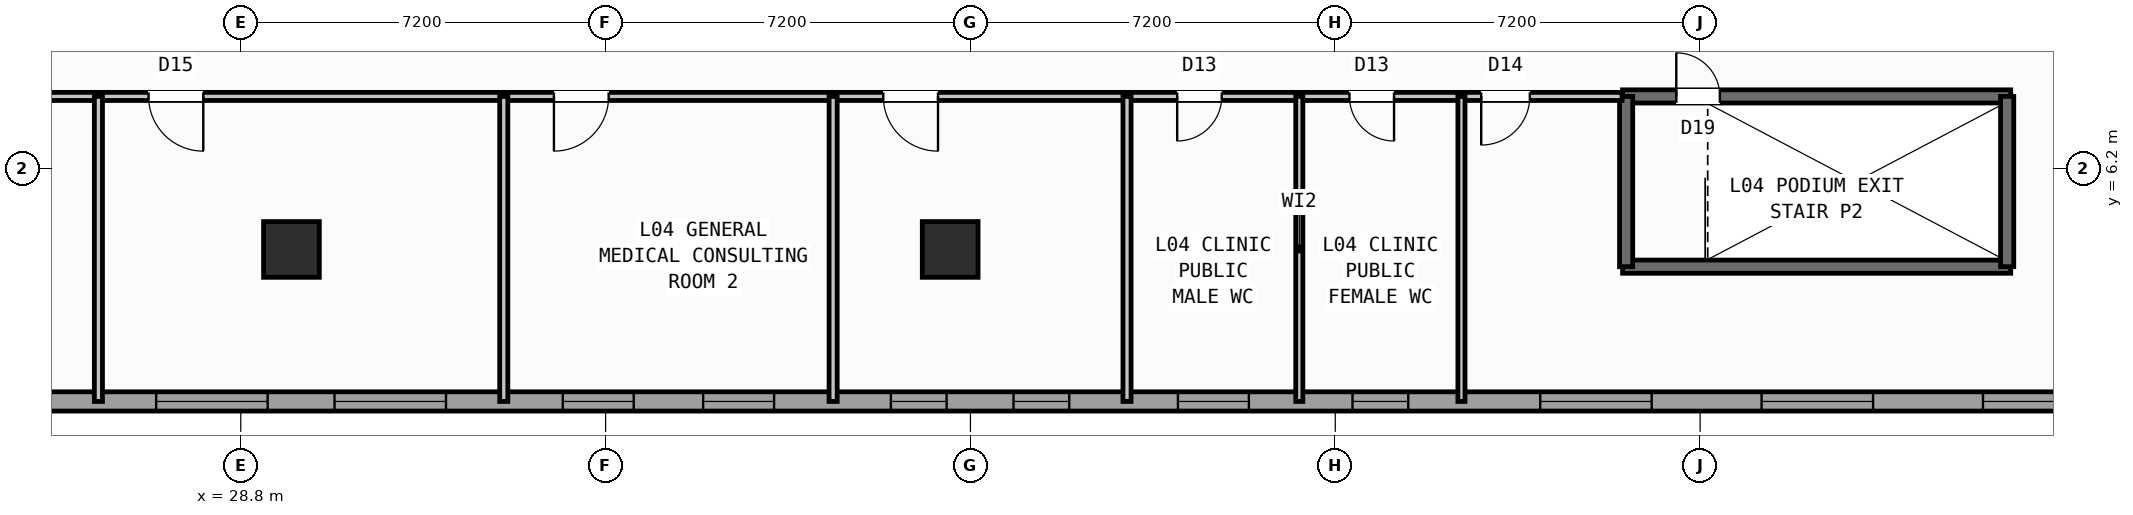
"""IFC4 building model, lengths in metres.
Left out: names, types, materials, properties, quantities, classifications, styles, units other than length and angle.
Written with IfcOpenShell. Run it as: python <this file> out.ifc"""

import sys

from ifc_helpers import new_model, si_unit, direction, frame, frame_2d, origin, origin_2d, place, context, subcontext, project, spatial, rectangle, hollow_rectangle, extrude, source, transform, mapped, element, fill, save


model = new_model("IFC4")
c1 = context("Model", 3, precision=1e-05, world=origin(), true_north=direction((0.0, 1.0)))
c2 = subcontext(c1, "Body", "Model", "MODEL_VIEW")
j1 = project(units=[si_unit("LENGTHUNIT", "METRE"), si_unit("PLANEANGLEUNIT", "RADIAN")], contexts=[c1])
p1 = place(None, origin())
s1 = spatial("IfcSite", under=j1, at=p1, CompositionType="ELEMENT")
p2 = place(p1, origin())
s2 = spatial("IfcBuilding", under=s1, at=p2, CompositionType="ELEMENT")
p3 = place(p2, frame((0.0, 0.0, 18.6)))
s3 = spatial("IfcBuildingStorey", under=s2, at=p3, CompositionType="ELEMENT", Elevation=18.6)
m1 = source(origin(), c2, "Body", "SweptSolid", [
    extrude(hollow_rectangle(XDim=1.1, YDim=1.1, WallThickness=0.04, at=origin_2d()), origin(), (0.0, 0.0, 1.0), 5.4),
])
for number, where, z_axis, x_axis in (
    (1, (29.8, 4.6, 0.0), (0.0, 0.0, 1.0), (1.0, 0.0, 0.0)),
    (2, (42.8, 4.6, 0.0), (0.0, 0.0, 1.0), (1.0, 0.0, 0.0)),
):
    element("IfcColumn", number, at=place(p3, frame(where, z_axis=z_axis, x_axis=x_axis)), inside=s3, PredefinedType="COLUMN", context=c2, shape_type="MappedRepresentation", body=[
        mapped(m1, transform((0.0, 0.0, 0.0), scale=1.0)),
    ])
p4 = place(p3, frame((67.117, 1.6, 0.0), z_axis=(0.0, 0.0, 1.0), x_axis=(-1.0, 0.0, 0.0)))
e3 = element("IfcWall", 3, at=p4, inside=s3, PredefinedType="STANDARD", context=c2, shape_type="SweptSolid", body=[
    extrude(rectangle(XDim=62.234, YDim=0.38, at=frame_2d((31.117, 0.0))), origin(), (0.0, 0.0, 1.0), 4.95),
])
p5 = place(p4, frame((1.735, 0.0, 0.85)))
e4 = element("IfcOpeningElement", 4, at=p5, cuts=e3, PredefinedType="OPENING", context=c2, shape_type="SweptSolid", body=[
    extrude(rectangle(XDim=2.2, YDim=1.75, at=frame_2d((1.1, 0.875))), frame((0.0, 0.2, 0.0), z_axis=(0.0, -1.0, 0.0), x_axis=(1.0, 0.0, 0.0)), (0.0, 0.0, 1.0), 0.4),
])
p6 = place(p4, frame((6.104, 0.0, 0.85)))
e5 = element("IfcOpeningElement", 5, at=p6, cuts=e3, PredefinedType="OPENING", context=c2, shape_type="SweptSolid", body=[
    extrude(rectangle(XDim=2.2, YDim=1.75, at=frame_2d((1.1, 0.875))), frame((0.0, 0.2, 0.0), z_axis=(0.0, -1.0, 0.0), x_axis=(1.0, 0.0, 0.0)), (0.0, 0.0, 1.0), 0.4),
])
p7 = place(p4, frame((10.473, 0.0, 0.85)))
e6 = element("IfcOpeningElement", 6, at=p7, cuts=e3, PredefinedType="OPENING", context=c2, shape_type="SweptSolid", body=[
    extrude(rectangle(XDim=2.2, YDim=1.75, at=frame_2d((1.1, 0.875))), frame((0.0, 0.2, 0.0), z_axis=(0.0, -1.0, 0.0), x_axis=(1.0, 0.0, 0.0)), (0.0, 0.0, 1.0), 0.4),
])
p8 = place(p4, frame((15.277, 0.0, 1.0)))
e7 = element("IfcOpeningElement", 7, at=p8, cuts=e3, PredefinedType="OPENING", context=c2, shape_type="SweptSolid", body=[
    extrude(rectangle(XDim=1.1, YDim=1.35, at=frame_2d((0.55, 0.675))), frame((0.0, 0.2, 0.0), z_axis=(0.0, -1.0, 0.0), x_axis=(1.0, 0.0, 0.0)), (0.0, 0.0, 1.0), 0.4),
])
p9 = place(p4, frame((18.422, 0.0, 0.95)))
e8 = element("IfcOpeningElement", 8, at=p9, cuts=e3, PredefinedType="OPENING", context=c2, shape_type="SweptSolid", body=[
    extrude(rectangle(XDim=1.4, YDim=1.5, at=frame_2d((0.7, 0.75))), frame((0.0, 0.2, 0.0), z_axis=(0.0, -1.0, 0.0), x_axis=(1.0, 0.0, 0.0)), (0.0, 0.0, 1.0), 0.4),
])
p10 = place(p4, frame((21.967, 0.0, 1.0)))
e9 = element("IfcOpeningElement", 9, at=p10, cuts=e3, PredefinedType="OPENING", context=c2, shape_type="SweptSolid", body=[
    extrude(rectangle(XDim=1.1, YDim=1.35, at=frame_2d((0.55, 0.675))), frame((0.0, 0.2, 0.0), z_axis=(0.0, -1.0, 0.0), x_axis=(1.0, 0.0, 0.0)), (0.0, 0.0, 1.0), 0.4),
])
p11 = place(p4, frame((24.387, 0.0, 1.0)))
e10 = element("IfcOpeningElement", 10, at=p11, cuts=e3, PredefinedType="OPENING", context=c2, shape_type="SweptSolid", body=[
    extrude(rectangle(XDim=1.1, YDim=1.35, at=frame_2d((0.55, 0.675))), frame((0.0, 0.2, 0.0), z_axis=(0.0, -1.0, 0.0), x_axis=(1.0, 0.0, 0.0)), (0.0, 0.0, 1.0), 0.4),
])
p12 = place(p4, frame((27.792, 0.0, 0.95)))
e11 = element("IfcOpeningElement", 11, at=p12, cuts=e3, PredefinedType="OPENING", context=c2, shape_type="SweptSolid", body=[
    extrude(rectangle(XDim=1.4, YDim=1.5, at=frame_2d((0.7, 0.75))), frame((0.0, 0.2, 0.0), z_axis=(0.0, -1.0, 0.0), x_axis=(1.0, 0.0, 0.0)), (0.0, 0.0, 1.0), 0.4),
])
p13 = place(p4, frame((30.562, 0.0, 0.95)))
e12 = element("IfcOpeningElement", 12, at=p13, cuts=e3, PredefinedType="OPENING", context=c2, shape_type="SweptSolid", body=[
    extrude(rectangle(XDim=1.4, YDim=1.5, at=frame_2d((0.7, 0.75))), frame((0.0, 0.2, 0.0), z_axis=(0.0, -1.0, 0.0), x_axis=(1.0, 0.0, 0.0)), (0.0, 0.0, 1.0), 0.4),
])
p14 = place(p4, frame((34.267, 0.0, 0.85)))
e13 = element("IfcOpeningElement", 13, at=p14, cuts=e3, PredefinedType="OPENING", context=c2, shape_type="SweptSolid", body=[
    extrude(rectangle(XDim=2.2, YDim=1.75, at=frame_2d((1.1, 0.875))), frame((0.0, 0.2, 0.0), z_axis=(0.0, -1.0, 0.0), x_axis=(1.0, 0.0, 0.0)), (0.0, 0.0, 1.0), 0.4),
])
p15 = place(p4, frame((37.787, 0.0, 0.85)))
e14 = element("IfcOpeningElement", 14, at=p15, cuts=e3, PredefinedType="OPENING", context=c2, shape_type="SweptSolid", body=[
    extrude(rectangle(XDim=2.2, YDim=1.75, at=frame_2d((1.1, 0.875))), frame((0.0, 0.2, 0.0), z_axis=(0.0, -1.0, 0.0), x_axis=(1.0, 0.0, 0.0)), (0.0, 0.0, 1.0), 0.4),
])
p16 = place(p4, frame((42.306, 0.0, 1.0)))
e15 = element("IfcOpeningElement", 15, at=p16, cuts=e3, PredefinedType="OPENING", context=c2, shape_type="SweptSolid", body=[
    extrude(rectangle(XDim=1.1, YDim=1.35, at=frame_2d((0.55, 0.675))), frame((0.0, 0.2, 0.0), z_axis=(0.0, -1.0, 0.0), x_axis=(1.0, 0.0, 0.0)), (0.0, 0.0, 1.0), 0.4),
])
p17 = place(p4, frame((44.803, 0.0, 1.0)))
e16 = element("IfcOpeningElement", 16, at=p17, cuts=e3, PredefinedType="OPENING", context=c2, shape_type="SweptSolid", body=[
    extrude(rectangle(XDim=1.1, YDim=1.35, at=frame_2d((0.55, 0.675))), frame((0.0, 0.2, 0.0), z_axis=(0.0, -1.0, 0.0), x_axis=(1.0, 0.0, 0.0)), (0.0, 0.0, 1.0), 0.4),
])
p18 = place(p4, frame((47.3, 0.0, 1.0)))
e17 = element("IfcOpeningElement", 17, at=p18, cuts=e3, PredefinedType="OPENING", context=c2, shape_type="SweptSolid", body=[
    extrude(rectangle(XDim=1.1, YDim=1.35, at=frame_2d((0.55, 0.675))), frame((0.0, 0.2, 0.0), z_axis=(0.0, -1.0, 0.0), x_axis=(1.0, 0.0, 0.0)), (0.0, 0.0, 1.0), 0.4),
])
p19 = place(p4, frame((49.797, 0.0, 1.0)))
e18 = element("IfcOpeningElement", 18, at=p19, cuts=e3, PredefinedType="OPENING", context=c2, shape_type="SweptSolid", body=[
    extrude(rectangle(XDim=1.1, YDim=1.35, at=frame_2d((0.55, 0.675))), frame((0.0, 0.2, 0.0), z_axis=(0.0, -1.0, 0.0), x_axis=(1.0, 0.0, 0.0)), (0.0, 0.0, 1.0), 0.4),
])
p20 = place(p4, frame((52.294, 0.0, 1.0)))
e19 = element("IfcOpeningElement", 19, at=p20, cuts=e3, PredefinedType="OPENING", context=c2, shape_type="SweptSolid", body=[
    extrude(rectangle(XDim=1.1, YDim=1.35, at=frame_2d((0.55, 0.675))), frame((0.0, 0.2, 0.0), z_axis=(0.0, -1.0, 0.0), x_axis=(1.0, 0.0, 0.0)), (0.0, 0.0, 1.0), 0.4),
])
p21 = place(p4, frame((54.792, 0.0, 1.0)))
e20 = element("IfcOpeningElement", 20, at=p21, cuts=e3, PredefinedType="OPENING", context=c2, shape_type="SweptSolid", body=[
    extrude(rectangle(XDim=1.1, YDim=1.35, at=frame_2d((0.55, 0.675))), frame((0.0, 0.2, 0.0), z_axis=(0.0, -1.0, 0.0), x_axis=(1.0, 0.0, 0.0)), (0.0, 0.0, 1.0), 0.4),
])
p22 = place(p4, frame((57.289, 0.0, 1.0)))
e21 = element("IfcOpeningElement", 21, at=p22, cuts=e3, PredefinedType="OPENING", context=c2, shape_type="SweptSolid", body=[
    extrude(rectangle(XDim=1.1, YDim=1.35, at=frame_2d((0.55, 0.675))), frame((0.0, 0.2, 0.0), z_axis=(0.0, -1.0, 0.0), x_axis=(1.0, 0.0, 0.0)), (0.0, 0.0, 1.0), 0.4),
])
p23 = place(p4, frame((59.786, 0.0, 1.0)))
e22 = element("IfcOpeningElement", 22, at=p23, cuts=e3, PredefinedType="OPENING", context=c2, shape_type="SweptSolid", body=[
    extrude(rectangle(XDim=1.1, YDim=1.35, at=frame_2d((0.55, 0.675))), frame((0.0, 0.2, 0.0), z_axis=(0.0, -1.0, 0.0), x_axis=(1.0, 0.0, 0.0)), (0.0, 0.0, 1.0), 0.4),
])
p24 = place(p3, frame((56.07, 7.62, 0.0), z_axis=(0.0, 0.0, 1.0), x_axis=(1.0, 0.0, 0.0)))
e23 = element("IfcWall", 23, at=p24, inside=s3, PredefinedType="SHEAR", context=c2, shape_type="SweptSolid", body=[
    extrude(rectangle(XDim=7.66, YDim=0.26, at=frame_2d((3.83, 0.0))), origin(), (0.0, 0.0, 1.0), 5.2),
])
p25 = place(p24, frame((1.06, 0.0, 0.0)))
e24 = element("IfcOpeningElement", 24, at=p25, cuts=e23, PredefinedType="OPENING", context=c2, shape_type="SweptSolid", body=[
    extrude(rectangle(XDim=0.86, YDim=2.05, at=frame_2d((0.43, 1.025))), frame((0.0, 0.14, 0.0), z_axis=(0.0, -1.0, 0.0), x_axis=(1.0, 0.0, 0.0)), (0.0, 0.0, 1.0), 0.28),
])
p26 = place(p3, frame((56.07, 4.26, 0.0), z_axis=(0.0, 0.0, 1.0), x_axis=(1.0, 0.0, 0.0)))
e25 = element("IfcWall", 25, at=p26, inside=s3, PredefinedType="SHEAR", context=c2, shape_type="SweptSolid", body=[
    extrude(rectangle(XDim=7.66, YDim=0.26, at=frame_2d((3.83, 0.0))), origin(), (0.0, 0.0, 1.0), 5.2),
])
for number, where, z_axis, x_axis in (
    (26, (56.14, 4.26, 0.0), (0.0, 0.0, 1.0), (0.0, 1.0, 0.0)),
    (27, (63.66, 4.26, 0.0), (0.0, 0.0, 1.0), (0.0, 1.0, 0.0)),
):
    element("IfcWall", number, at=place(p3, frame(where, z_axis=z_axis, x_axis=x_axis)), inside=s3, PredefinedType="SHEAR", context=c2, shape_type="SweptSolid", body=[
        extrude(rectangle(XDim=3.36, YDim=0.26, at=frame_2d((1.68, 0.0))), origin(), (0.0, 0.0, 1.0), 5.2),
    ])
p27 = place(p3, frame((16.74, 7.62, 0.0), z_axis=(0.0, 0.0, 1.0), x_axis=(1.0, 0.0, 0.0)))
e28 = element("IfcWall", 28, at=p27, inside=s3, PredefinedType="PARTITIONING", context=c2, shape_type="SweptSolid", body=[
    extrude(rectangle(XDim=39.32, YDim=0.16, at=frame_2d((19.66, 0.0))), origin(), (0.0, 0.0, 1.0), 4.94),
])
p28 = place(p27, frame((1.26, 0.0, 0.0)))
e29 = element("IfcOpeningElement", 29, at=p28, cuts=e28, PredefinedType="OPENING", context=c2, shape_type="SweptSolid", body=[
    extrude(rectangle(XDim=1.08, YDim=2.15, at=frame_2d((0.54, 1.075))), frame((0.0, 0.09, 0.0), z_axis=(0.0, -1.0, 0.0), x_axis=(1.0, 0.0, 0.0)), (0.0, 0.0, 1.0), 0.18),
])
p29 = place(p27, frame((10.24, 0.0, 0.0)))
e30 = element("IfcOpeningElement", 30, at=p29, cuts=e28, PredefinedType="OPENING", context=c2, shape_type="SweptSolid", body=[
    extrude(rectangle(XDim=1.08, YDim=2.15, at=frame_2d((0.54, 1.075))), frame((0.0, 0.09, 0.0), z_axis=(0.0, -1.0, 0.0), x_axis=(1.0, 0.0, 0.0)), (0.0, 0.0, 1.0), 0.18),
])
p30 = place(p27, frame((18.24, 0.0, 0.0)))
e31 = element("IfcOpeningElement", 31, at=p30, cuts=e28, PredefinedType="OPENING", context=c2, shape_type="SweptSolid", body=[
    extrude(rectangle(XDim=1.08, YDim=2.15, at=frame_2d((0.54, 1.075))), frame((0.0, 0.09, 0.0), z_axis=(0.0, -1.0, 0.0), x_axis=(1.0, 0.0, 0.0)), (0.0, 0.0, 1.0), 0.18),
])
p31 = place(p27, frame((24.74, 0.0, 0.0)))
e32 = element("IfcOpeningElement", 32, at=p31, cuts=e28, PredefinedType="OPENING", context=c2, shape_type="SweptSolid", body=[
    extrude(rectangle(XDim=1.08, YDim=2.15, at=frame_2d((0.54, 1.075))), frame((0.0, 0.09, 0.0), z_axis=(0.0, -1.0, 0.0), x_axis=(1.0, 0.0, 0.0)), (0.0, 0.0, 1.0), 0.18),
])
p32 = place(p27, frame((30.54, 0.0, 0.0)))
e33 = element("IfcOpeningElement", 33, at=p32, cuts=e28, PredefinedType="OPENING", context=c2, shape_type="SweptSolid", body=[
    extrude(rectangle(XDim=0.88, YDim=2.08, at=frame_2d((0.44, 1.04))), frame((0.0, 0.09, 0.0), z_axis=(0.0, -1.0, 0.0), x_axis=(1.0, 0.0, 0.0)), (0.0, 0.0, 1.0), 0.18),
])
p33 = place(p27, frame((33.94, 0.0, 0.0)))
e34 = element("IfcOpeningElement", 34, at=p33, cuts=e28, PredefinedType="OPENING", context=c2, shape_type="SweptSolid", body=[
    extrude(rectangle(XDim=0.88, YDim=2.08, at=frame_2d((0.44, 1.04))), frame((0.0, 0.09, 0.0), z_axis=(0.0, -1.0, 0.0), x_axis=(1.0, 0.0, 0.0)), (0.0, 0.0, 1.0), 0.18),
])
p34 = place(p27, frame((36.54, 0.0, 0.0)))
e35 = element("IfcOpeningElement", 35, at=p34, cuts=e28, PredefinedType="OPENING", context=c2, shape_type="SweptSolid", body=[
    extrude(rectangle(XDim=0.96, YDim=2.08, at=frame_2d((0.48, 1.04))), frame((0.0, 0.09, 0.0), z_axis=(0.0, -1.0, 0.0), x_axis=(1.0, 0.0, 0.0)), (0.0, 0.0, 1.0), 0.18),
])
for number, where, z_axis, x_axis in (
    (36, (25.99, 1.6, 0.0), (0.0, 0.0, 1.0), (0.0, 1.0, 0.0)),
    (37, (33.99, 1.6, 0.0), (0.0, 0.0, 1.0), (0.0, 1.0, 0.0)),
    (38, (40.49, 1.6, 0.0), (0.0, 0.0, 1.0), (0.0, 1.0, 0.0)),
    (39, (46.29, 1.6, 0.0), (0.0, 0.0, 1.0), (0.0, 1.0, 0.0)),
):
    element("IfcWall", number, at=place(p3, frame(where, z_axis=z_axis, x_axis=x_axis)), inside=s3, PredefinedType="PARTITIONING", context=c2, shape_type="SweptSolid", body=[
        extrude(rectangle(XDim=6.02, YDim=0.16, at=frame_2d((3.01, 0.0))), origin(), (0.0, 0.0, 1.0), 4.94),
    ])
for number, where, z_axis, x_axis in (
    (40, (49.69, 1.6, 0.0), (0.0, 0.0, 1.0), (0.0, 1.0, 0.0)),
    (41, (52.89, 1.6, 0.0), (0.0, 0.0, 1.0), (0.0, 1.0, 0.0)),
):
    element("IfcWall", number, at=place(p3, frame(where, z_axis=z_axis, x_axis=x_axis)), inside=s3, PredefinedType="PLUMBINGWALL", context=c2, shape_type="SweptSolid", body=[
        extrude(rectangle(XDim=6.02, YDim=0.14, at=frame_2d((3.01, 0.0))), origin(), (0.0, 0.0, 1.0), 4.94),
    ])
m2 = source(origin(), c2, "Body", "SweptSolid", [
    extrude(rectangle(XDim=2.2, YDim=1.75, at=frame_2d((1.1, 0.875))), frame((0.0, 0.03, 0.0), z_axis=(0.0, -1.0, 0.0), x_axis=(1.0, 0.0, 0.0)), (0.0, 0.0, 1.0), 0.06),
])
p35 = place(p5, origin())
e42 = element("IfcWindow", 42, at=p35, inside=s3, PartitioningType="SINGLE_PANEL", PredefinedType="WINDOW", context=c2, shape_type="MappedRepresentation", body=[
    mapped(m2, transform((0.0, 0.0, 0.0), scale=1.0)),
])
fill(e4, e42)
p36 = place(p6, origin())
e43 = element("IfcWindow", 43, at=p36, inside=s3, PartitioningType="SINGLE_PANEL", PredefinedType="WINDOW", context=c2, shape_type="MappedRepresentation", body=[
    mapped(m2, transform((0.0, 0.0, 0.0), scale=1.0)),
])
fill(e5, e43)
p37 = place(p7, origin())
e44 = element("IfcWindow", 44, at=p37, inside=s3, PartitioningType="SINGLE_PANEL", PredefinedType="WINDOW", context=c2, shape_type="MappedRepresentation", body=[
    mapped(m2, transform((0.0, 0.0, 0.0), scale=1.0)),
])
fill(e6, e44)
m3 = source(origin(), c2, "Body", "SweptSolid", [
    extrude(rectangle(XDim=1.1, YDim=1.35, at=frame_2d((0.55, 0.675))), frame((0.0, 0.03, 0.0), z_axis=(0.0, -1.0, 0.0), x_axis=(1.0, 0.0, 0.0)), (0.0, 0.0, 1.0), 0.06),
])
p38 = place(p8, origin())
e45 = element("IfcWindow", 45, at=p38, inside=s3, PartitioningType="SINGLE_PANEL", PredefinedType="WINDOW", context=c2, shape_type="MappedRepresentation", body=[
    mapped(m3, transform((0.0, 0.0, 0.0), scale=1.0)),
])
fill(e7, e45)
m4 = source(origin(), c2, "Body", "SweptSolid", [
    extrude(rectangle(XDim=1.4, YDim=1.5, at=frame_2d((0.7, 0.75))), frame((0.0, 0.03, 0.0), z_axis=(0.0, -1.0, 0.0), x_axis=(1.0, 0.0, 0.0)), (0.0, 0.0, 1.0), 0.06),
])
p39 = place(p9, origin())
e46 = element("IfcWindow", 46, at=p39, inside=s3, PartitioningType="SINGLE_PANEL", PredefinedType="WINDOW", context=c2, shape_type="MappedRepresentation", body=[
    mapped(m4, transform((0.0, 0.0, 0.0), scale=1.0)),
])
fill(e8, e46)
p40 = place(p10, origin())
e47 = element("IfcWindow", 47, at=p40, inside=s3, PartitioningType="SINGLE_PANEL", PredefinedType="WINDOW", context=c2, shape_type="MappedRepresentation", body=[
    mapped(m3, transform((0.0, 0.0, 0.0), scale=1.0)),
])
fill(e9, e47)
p41 = place(p11, origin())
e48 = element("IfcWindow", 48, at=p41, inside=s3, PartitioningType="SINGLE_PANEL", PredefinedType="WINDOW", context=c2, shape_type="MappedRepresentation", body=[
    mapped(m3, transform((0.0, 0.0, 0.0), scale=1.0)),
])
fill(e10, e48)
p42 = place(p12, origin())
e49 = element("IfcWindow", 49, at=p42, inside=s3, PartitioningType="SINGLE_PANEL", PredefinedType="WINDOW", context=c2, shape_type="MappedRepresentation", body=[
    mapped(m4, transform((0.0, 0.0, 0.0), scale=1.0)),
])
fill(e11, e49)
p43 = place(p13, origin())
e50 = element("IfcWindow", 50, at=p43, inside=s3, PartitioningType="SINGLE_PANEL", PredefinedType="WINDOW", context=c2, shape_type="MappedRepresentation", body=[
    mapped(m4, transform((0.0, 0.0, 0.0), scale=1.0)),
])
fill(e12, e50)
p44 = place(p14, origin())
e51 = element("IfcWindow", 51, at=p44, inside=s3, PartitioningType="SINGLE_PANEL", PredefinedType="WINDOW", context=c2, shape_type="MappedRepresentation", body=[
    mapped(m2, transform((0.0, 0.0, 0.0), scale=1.0)),
])
fill(e13, e51)
p45 = place(p15, origin())
e52 = element("IfcWindow", 52, at=p45, inside=s3, PartitioningType="SINGLE_PANEL", PredefinedType="WINDOW", context=c2, shape_type="MappedRepresentation", body=[
    mapped(m2, transform((0.0, 0.0, 0.0), scale=1.0)),
])
fill(e14, e52)
m5 = source(origin(), c2, "Body", "SweptSolid", [
    extrude(rectangle(XDim=0.86, YDim=2.05, at=frame_2d((0.43, 1.025))), frame((0.0, 0.025, 0.0), z_axis=(0.0, -1.0, 0.0), x_axis=(1.0, 0.0, 0.0)), (0.0, 0.0, 1.0), 0.05),
])
p46 = place(p25, origin())
e53 = element("IfcDoor", 53, at=p46, inside=s3, OperationType="SINGLE_SWING_LEFT", PredefinedType="DOOR", context=c2, shape_type="MappedRepresentation", body=[
    mapped(m5, transform((0.0, 0.0, 0.0), scale=1.0)),
])
fill(e24, e53)
m6 = source(origin(), c2, "Body", "SweptSolid", [
    extrude(rectangle(XDim=1.08, YDim=2.15, at=frame_2d((0.54, 1.075))), frame((0.0, 0.025, 0.0), z_axis=(0.0, -1.0, 0.0), x_axis=(1.0, 0.0, 0.0)), (0.0, 0.0, 1.0), 0.05),
])
p47 = place(p29, frame((1.08, 0.0, 0.0), z_axis=(0.0, 0.0, 1.0), x_axis=(-1.0, 0.0, 0.0)))
e54 = element("IfcDoor", 54, at=p47, inside=s3, OperationType="SINGLE_SWING_LEFT", PredefinedType="DOOR", context=c2, shape_type="MappedRepresentation", body=[
    mapped(m6, transform((0.0, 0.0, 0.0), scale=1.0)),
])
fill(e30, e54)
p48 = place(p30, frame((1.08, 0.0, 0.0), z_axis=(0.0, 0.0, 1.0), x_axis=(-1.0, 0.0, 0.0)))
e55 = element("IfcDoor", 55, at=p48, inside=s3, OperationType="SINGLE_SWING_RIGHT", PredefinedType="DOOR", context=c2, shape_type="MappedRepresentation", body=[
    mapped(m6, transform((0.0, 0.0, 0.0), scale=1.0)),
])
fill(e31, e55)
p49 = place(p31, frame((1.08, 0.0, 0.0), z_axis=(0.0, 0.0, 1.0), x_axis=(-1.0, 0.0, 0.0)))
e56 = element("IfcDoor", 56, at=p49, inside=s3, OperationType="SINGLE_SWING_LEFT", PredefinedType="DOOR", context=c2, shape_type="MappedRepresentation", body=[
    mapped(m6, transform((0.0, 0.0, 0.0), scale=1.0)),
])
fill(e32, e56)
m7 = source(origin(), c2, "Body", "SweptSolid", [
    extrude(rectangle(XDim=0.88, YDim=2.08, at=frame_2d((0.44, 1.04))), frame((0.0, 0.025, 0.0), z_axis=(0.0, -1.0, 0.0), x_axis=(1.0, 0.0, 0.0)), (0.0, 0.0, 1.0), 0.05),
])
p50 = place(p32, frame((0.88, 0.0, 0.0), z_axis=(0.0, 0.0, 1.0), x_axis=(-1.0, 0.0, 0.0)))
e57 = element("IfcDoor", 57, at=p50, inside=s3, OperationType="SINGLE_SWING_RIGHT", PredefinedType="DOOR", context=c2, shape_type="MappedRepresentation", body=[
    mapped(m7, transform((0.0, 0.0, 0.0), scale=1.0)),
])
fill(e33, e57)
p51 = place(p33, frame((0.88, 0.0, 0.0), z_axis=(0.0, 0.0, 1.0), x_axis=(-1.0, 0.0, 0.0)))
e58 = element("IfcDoor", 58, at=p51, inside=s3, OperationType="SINGLE_SWING_LEFT", PredefinedType="DOOR", context=c2, shape_type="MappedRepresentation", body=[
    mapped(m7, transform((0.0, 0.0, 0.0), scale=1.0)),
])
fill(e34, e58)
m8 = source(origin(), c2, "Body", "SweptSolid", [
    extrude(rectangle(XDim=0.96, YDim=2.08, at=frame_2d((0.48, 1.04))), frame((0.0, 0.025, 0.0), z_axis=(0.0, -1.0, 0.0), x_axis=(1.0, 0.0, 0.0)), (0.0, 0.0, 1.0), 0.05),
])
p52 = place(p34, frame((0.96, 0.0, 0.0), z_axis=(0.0, 0.0, 1.0), x_axis=(-1.0, 0.0, 0.0)))
e59 = element("IfcDoor", 59, at=p52, inside=s3, OperationType="SINGLE_SWING_RIGHT", PredefinedType="DOOR", context=c2, shape_type="MappedRepresentation", body=[
    mapped(m8, transform((0.0, 0.0, 0.0), scale=1.0)),
])
fill(e35, e59)
save(model, sys.argv[1])
